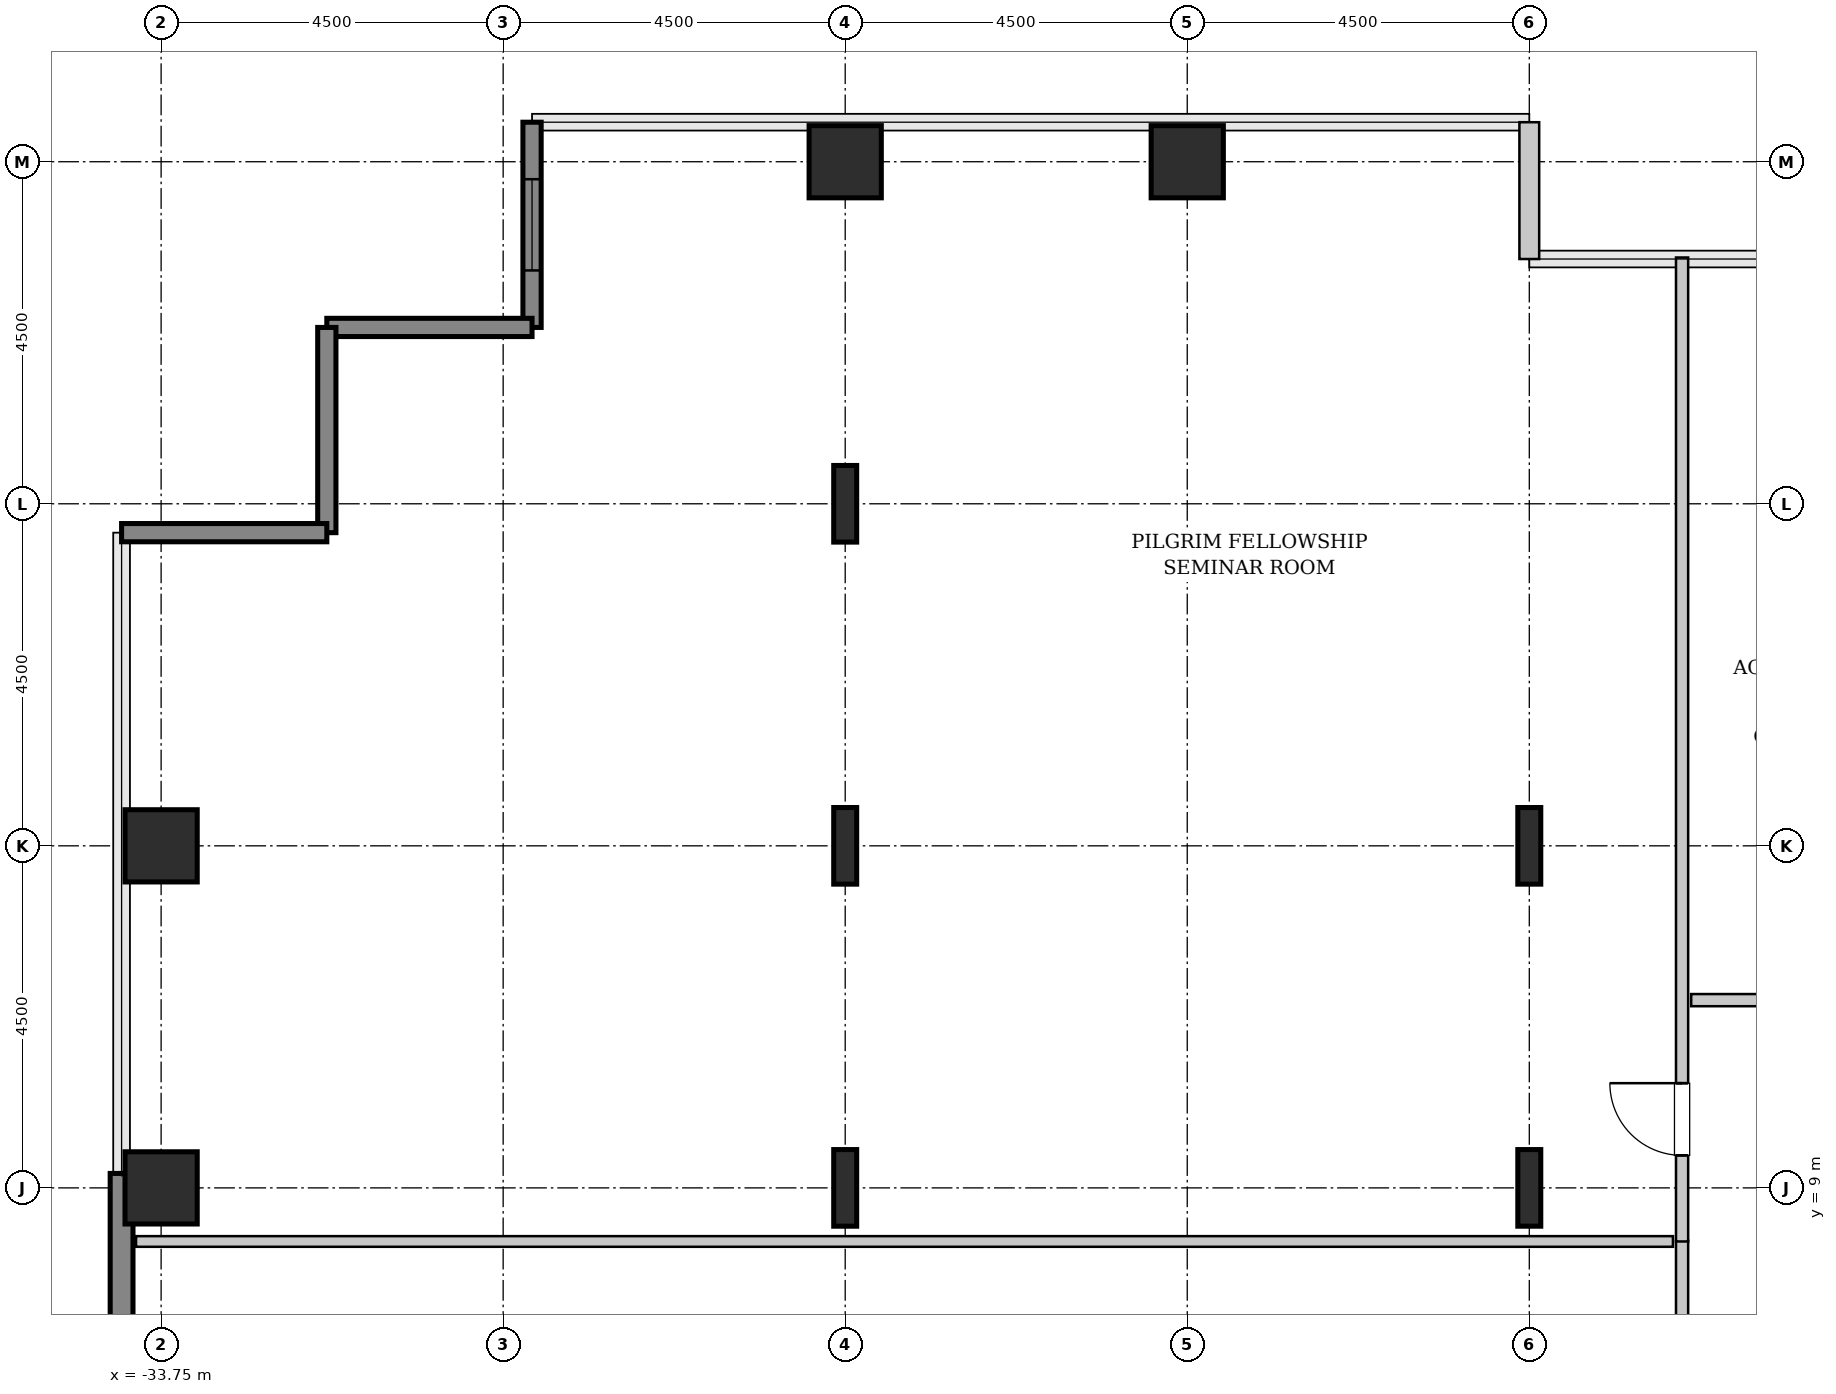
"""IFC4 building model, lengths in metres.
Left out: names, types, materials, properties, quantities, classifications, styles, units other than length and angle.
Written with IfcOpenShell. Run it as: python <this file> out.ifc"""

import sys

from ifc_helpers import new_model, si_unit, direction, frame, frame_2d, origin, origin_2d, place, context, subcontext, project, spatial, rectangle, hollow_rectangle, i_section, extrude, source, transform, mapped, element, fill, save


model = new_model("IFC4")
c1 = context("Model", 3, precision=1e-05, world=origin(), true_north=direction((0.0, 1.0)))
c2 = subcontext(c1, "Body", "Model", "MODEL_VIEW")
j1 = project(units=[si_unit("LENGTHUNIT", "METRE"), si_unit("PLANEANGLEUNIT", "RADIAN")], contexts=[c1])
p1 = place(None, origin())
s1 = spatial("IfcSite", under=j1, at=p1, CompositionType="ELEMENT")
p2 = place(p1, origin())
s2 = spatial("IfcBuilding", under=s1, at=p2, CompositionType="ELEMENT")
p3 = place(p2, frame((0.0, 0.0, 90.8)))
s3 = spatial("IfcBuildingStorey", under=s2, at=p3, CompositionType="ELEMENT", Elevation=90.8)
m1 = source(origin(), c2, "Body", "SweptSolid", [
    extrude(hollow_rectangle(XDim=0.95, YDim=0.95, WallThickness=0.045, InnerFilletRadius=0.045, OuterFilletRadius=0.09, at=origin_2d()), origin(), (0.0, 0.0, 1.0), 3.8),
])
for number, where, z_axis, x_axis in (
    (1, (-33.75, 9.0, 0.0), (0.0, 0.0, 1.0), (1.0, 0.0, 0.0)),
    (2, (-33.75, 13.5, 0.0), (0.0, 0.0, 1.0), (1.0, 0.0, 0.0)),
):
    element("IfcColumn", number, at=place(p3, frame(where, z_axis=z_axis, x_axis=x_axis)), inside=s3, PredefinedType="COLUMN", context=c2, shape_type="MappedRepresentation", body=[
        mapped(m1, transform((0.0, 0.0, 0.0), x_axis=(1.0, 0.0, 0.0), y_axis=(0.0, 1.0, 0.0), z_axis=(0.0, 0.0, 1.0), scale=1.0)),
    ])
m2 = source(origin(), c2, "Body", "SweptSolid", [
    extrude(i_section(OverallWidth=0.302, OverallDepth=1.008, WebThickness=0.021, FlangeThickness=0.04, FilletRadius=0.03, at=origin_2d()), origin(), (0.0, 0.0, 1.0), 3.8),
])
for number, where, z_axis, x_axis in (
    (3, (-24.75, 9.0, 0.0), (0.0, 0.0, 1.0), (1.0, 0.0, 0.0)),
    (4, (-24.75, 13.5, 0.0), (0.0, 0.0, 1.0), (1.0, 0.0, 0.0)),
    (5, (-24.75, 18.0, 0.0), (0.0, 0.0, 1.0), (1.0, 0.0, 0.0)),
):
    element("IfcColumn", number, at=place(p3, frame(where, z_axis=z_axis, x_axis=x_axis)), inside=s3, PredefinedType="COLUMN", context=c2, shape_type="MappedRepresentation", body=[
        mapped(m2, transform((0.0, 0.0, 0.0), x_axis=(1.0, 0.0, 0.0), y_axis=(0.0, 1.0, 0.0), z_axis=(0.0, 0.0, 1.0), scale=1.0)),
    ])
for number, where, z_axis, x_axis in (
    (6, (-24.75, 22.5, 0.0), (0.0, 0.0, 1.0), (1.0, 0.0, 0.0)),
    (7, (-20.25, 22.5, 0.0), (0.0, 0.0, 1.0), (1.0, 0.0, 0.0)),
):
    element("IfcColumn", number, at=place(p3, frame(where, z_axis=z_axis, x_axis=x_axis)), inside=s3, PredefinedType="COLUMN", context=c2, shape_type="MappedRepresentation", body=[
        mapped(m1, transform((0.0, 0.0, 0.0), x_axis=(1.0, 0.0, 0.0), y_axis=(0.0, 1.0, 0.0), z_axis=(0.0, 0.0, 1.0), scale=1.0)),
    ])
for number, where, z_axis, x_axis in (
    (8, (-15.75, 9.0, 0.0), (0.0, 0.0, 1.0), (1.0, 0.0, 0.0)),
    (9, (-15.75, 13.5, 0.0), (0.0, 0.0, 1.0), (1.0, 0.0, 0.0)),
):
    element("IfcColumn", number, at=place(p3, frame(where, z_axis=z_axis, x_axis=x_axis)), inside=s3, PredefinedType="COLUMN", context=c2, shape_type="MappedRepresentation", body=[
        mapped(m2, transform((0.0, 0.0, 0.0), x_axis=(1.0, 0.0, 0.0), y_axis=(0.0, 1.0, 0.0), z_axis=(0.0, 0.0, 1.0), scale=1.0)),
    ])
m3 = source(origin(), c2, "Body", "SweptSolid", [
    extrude(rectangle(XDim=4.88, YDim=0.3, at=frame_2d((2.44, 0.0))), origin(), (0.0, 0.0, 1.0), 3.55),
])
p4 = place(p3, frame((-34.27, 4.31, 0.0), z_axis=(0.0, 0.0, 1.0), x_axis=(0.0, 1.0, 0.0)))
e10 = element("IfcWall", 10, at=p4, inside=s3, PredefinedType="SHEAR", context=c2, shape_type="MappedRepresentation", body=[
    mapped(m3, transform((0.0, 0.0, 0.0), x_axis=(1.0, 0.0, 0.0), y_axis=(0.0, 1.0, 0.0), z_axis=(0.0, 0.0, 1.0), scale=1.0)),
])
m4 = source(origin(), c2, "Body", "SweptSolid", [
    extrude(rectangle(XDim=1.8, YDim=0.26, at=frame_2d((0.9, 0.0))), origin(), (0.0, 0.0, 1.0), 3.55),
])
p5 = place(p3, frame((-15.75, 21.22, 0.0), z_axis=(0.0, 0.0, 1.0), x_axis=(0.0, 1.0, 0.0)))
e11 = element("IfcWall", 11, at=p5, inside=s3, PredefinedType="SOLIDWALL", context=c2, shape_type="MappedRepresentation", body=[
    mapped(m4, transform((0.0, 0.0, 0.0), x_axis=(1.0, 0.0, 0.0), y_axis=(0.0, 1.0, 0.0), z_axis=(0.0, 0.0, 1.0), scale=1.0)),
])
m5 = source(origin(), c2, "Body", "SweptSolid", [
    extrude(rectangle(XDim=2.7, YDim=0.24, at=frame_2d((1.35, 0.0))), origin(), (0.0, 0.0, 1.0), 3.55),
])
p6 = place(p3, frame((-28.87, 23.02, 0.0), z_axis=(0.0, 0.0, 1.0), x_axis=(0.0, -1.0, 0.0)))
e12 = element("IfcWall", 12, at=p6, inside=s3, PredefinedType="SHEAR", context=c2, shape_type="MappedRepresentation", body=[
    mapped(m5, transform((0.0, 0.0, 0.0), x_axis=(1.0, 0.0, 0.0), y_axis=(0.0, 1.0, 0.0), z_axis=(0.0, 0.0, 1.0), scale=1.0)),
])
p7 = place(p6, frame((0.75, 0.0, 0.85)))
e13 = element("IfcOpeningElement", 13, at=p7, cuts=e12, PredefinedType="OPENING", context=c2, shape_type="SweptSolid", body=[
    extrude(rectangle(XDim=1.2, YDim=1.8, at=frame_2d((0.6, 0.9))), frame((0.0, 0.13, 0.0), z_axis=(0.0, -1.0, 0.0), x_axis=(1.0, 0.0, 0.0)), (0.0, 0.0, 1.0), 0.26),
])
for number, where, z_axis, x_axis in (
    (14, (-28.87, 20.32, 0.0), (0.0, 0.0, 1.0), (-1.0, 0.0, 0.0)),
    (15, (-31.57, 20.32, 0.0), (0.0, 0.0, 1.0), (0.0, -1.0, 0.0)),
    (16, (-31.57, 17.62, 0.0), (0.0, 0.0, 1.0), (-1.0, 0.0, 0.0)),
):
    element("IfcWall", number, at=place(p3, frame(where, z_axis=z_axis, x_axis=x_axis)), inside=s3, PredefinedType="SHEAR", context=c2, shape_type="MappedRepresentation", body=[
        mapped(m5, transform((0.0, 0.0, 0.0), x_axis=(1.0, 0.0, 0.0), y_axis=(0.0, 1.0, 0.0), z_axis=(0.0, 0.0, 1.0), scale=1.0)),
    ])
m6 = source(origin(), c2, "Body", "SweptSolid", [
    extrude(rectangle(XDim=3.3, YDim=0.16, at=frame_2d((1.65, 0.0))), origin(), (0.0, 0.0, 1.0), 3.535),
])
p8 = place(p3, frame((-13.74, 5.005, 0.0), z_axis=(0.0, 0.0, 1.0), x_axis=(0.0, 1.0, 0.0)))
e17 = element("IfcWall", 17, at=p8, inside=s3, PredefinedType="PARTITIONING", context=c2, shape_type="MappedRepresentation", body=[
    mapped(m6, transform((0.0, 0.0, 0.0), x_axis=(1.0, 0.0, 0.0), y_axis=(0.0, 1.0, 0.0), z_axis=(0.0, 0.0, 1.0), scale=1.0)),
])
p9 = place(p8, frame((1.175, 0.0, 0.0)))
e18 = element("IfcOpeningElement", 18, at=p9, cuts=e17, PredefinedType="OPENING", context=c2, shape_type="SweptSolid", body=[
    extrude(rectangle(XDim=0.95, YDim=2.1, at=frame_2d((0.475, 1.05))), frame((0.0, 0.09, 0.0), z_axis=(0.0, -1.0, 0.0), x_axis=(1.0, 0.0, 0.0)), (0.0, 0.0, 1.0), 0.18),
])
m7 = source(origin(), c2, "Body", "SweptSolid", [
    extrude(rectangle(XDim=20.22, YDim=0.14, at=frame_2d((10.11, 0.0))), origin(), (0.0, 0.0, 1.0), 3.535),
])
p10 = place(p3, frame((-34.08, 8.295, 0.0), z_axis=(0.0, 0.0, 1.0), x_axis=(1.0, 0.0, 0.0)))
e19 = element("IfcWall", 19, at=p10, inside=s3, PredefinedType="PARTITIONING", context=c2, shape_type="MappedRepresentation", body=[
    mapped(m7, transform((0.0, 0.0, 0.0), x_axis=(1.0, 0.0, 0.0), y_axis=(0.0, 1.0, 0.0), z_axis=(0.0, 0.0, 1.0), scale=1.0)),
])
m8 = source(origin(), c2, "Body", "SweptSolid", [
    extrude(rectangle(XDim=12.945, YDim=0.16, at=frame_2d((6.473, 0.0))), origin(), (0.0, 0.0, 1.0), 3.535),
])
p11 = place(p3, frame((-13.74, 8.295, 0.0), z_axis=(0.0, 0.0, 1.0), x_axis=(0.0, 1.0, 0.0)))
e20 = element("IfcWall", 20, at=p11, inside=s3, PredefinedType="PARTITIONING", context=c2, shape_type="MappedRepresentation", body=[
    mapped(m8, transform((0.0, 0.0, 0.0), x_axis=(1.0, 0.0, 0.0), y_axis=(0.0, 1.0, 0.0), z_axis=(0.0, 0.0, 1.0), scale=1.0)),
])
p12 = place(p11, frame((1.133, 0.0, 0.0)))
e21 = element("IfcOpeningElement", 21, at=p12, cuts=e20, PredefinedType="OPENING", context=c2, shape_type="SweptSolid", body=[
    extrude(rectangle(XDim=0.95, YDim=2.1, at=frame_2d((0.475, 1.05))), frame((0.0, 0.09, 0.0), z_axis=(0.0, -1.0, 0.0), x_axis=(1.0, 0.0, 0.0)), (0.0, 0.0, 1.0), 0.18),
])
m9 = source(origin(), c2, "Body", "SweptSolid", [
    extrude(rectangle(XDim=4.125, YDim=0.16, at=frame_2d((2.062, 0.0))), origin(), (0.0, 0.0, 1.0), 3.535),
])
p13 = place(p3, frame((-13.62, 11.47, 0.0), z_axis=(0.0, 0.0, 1.0), x_axis=(1.0, 0.0, 0.0)))
e22 = element("IfcWall", 22, at=p13, inside=s3, PredefinedType="PARTITIONING", context=c2, shape_type="MappedRepresentation", body=[
    mapped(m9, transform((0.0, 0.0, 0.0), x_axis=(1.0, 0.0, 0.0), y_axis=(0.0, 1.0, 0.0), z_axis=(0.0, 0.0, 1.0), scale=1.0)),
])
p14 = place(p13, frame((1.587, 0.0, 0.0)))
e23 = element("IfcOpeningElement", 23, at=p14, cuts=e22, PredefinedType="OPENING", context=c2, shape_type="SweptSolid", body=[
    extrude(rectangle(XDim=0.95, YDim=2.1, at=frame_2d((0.475, 1.05))), frame((0.0, 0.09, 0.0), z_axis=(0.0, -1.0, 0.0), x_axis=(1.0, 0.0, 0.0)), (0.0, 0.0, 1.0), 0.18),
])
m10 = source(origin(), c2, "Body", "SweptSolid", [
    extrude(rectangle(XDim=1.2, YDim=1.8, at=frame_2d((0.6, 0.9))), frame((0.0, 0.03, 0.0), z_axis=(0.0, -1.0, 0.0), x_axis=(1.0, 0.0, 0.0)), (0.0, 0.0, 1.0), 0.06),
])
p15 = place(p7, origin())
e24 = element("IfcWindow", 24, at=p15, inside=s3, PartitioningType="SINGLE_PANEL", PredefinedType="WINDOW", context=c2, shape_type="MappedRepresentation", body=[
    mapped(m10, transform((0.0, 0.0, 0.0), x_axis=(1.0, 0.0, 0.0), y_axis=(0.0, 1.0, 0.0), z_axis=(0.0, 0.0, 1.0), scale=1.0)),
])
fill(e13, e24)
m11 = source(origin(), c2, "Body", "SweptSolid", [
    extrude(rectangle(XDim=0.95, YDim=2.1, at=frame_2d((0.475, 1.05))), frame((0.0, 0.025, 0.0), z_axis=(0.0, -1.0, 0.0), x_axis=(1.0, 0.0, 0.0)), (0.0, 0.0, 1.0), 0.05),
])
p16 = place(p12, origin())
e25 = element("IfcDoor", 25, at=p16, inside=s3, OperationType="SINGLE_SWING_RIGHT", PredefinedType="DOOR", context=c2, shape_type="MappedRepresentation", body=[
    mapped(m11, transform((0.0, 0.0, 0.0), x_axis=(1.0, 0.0, 0.0), y_axis=(0.0, 1.0, 0.0), z_axis=(0.0, 0.0, 1.0), scale=1.0)),
])
fill(e21, e25)
save(model, sys.argv[1])
